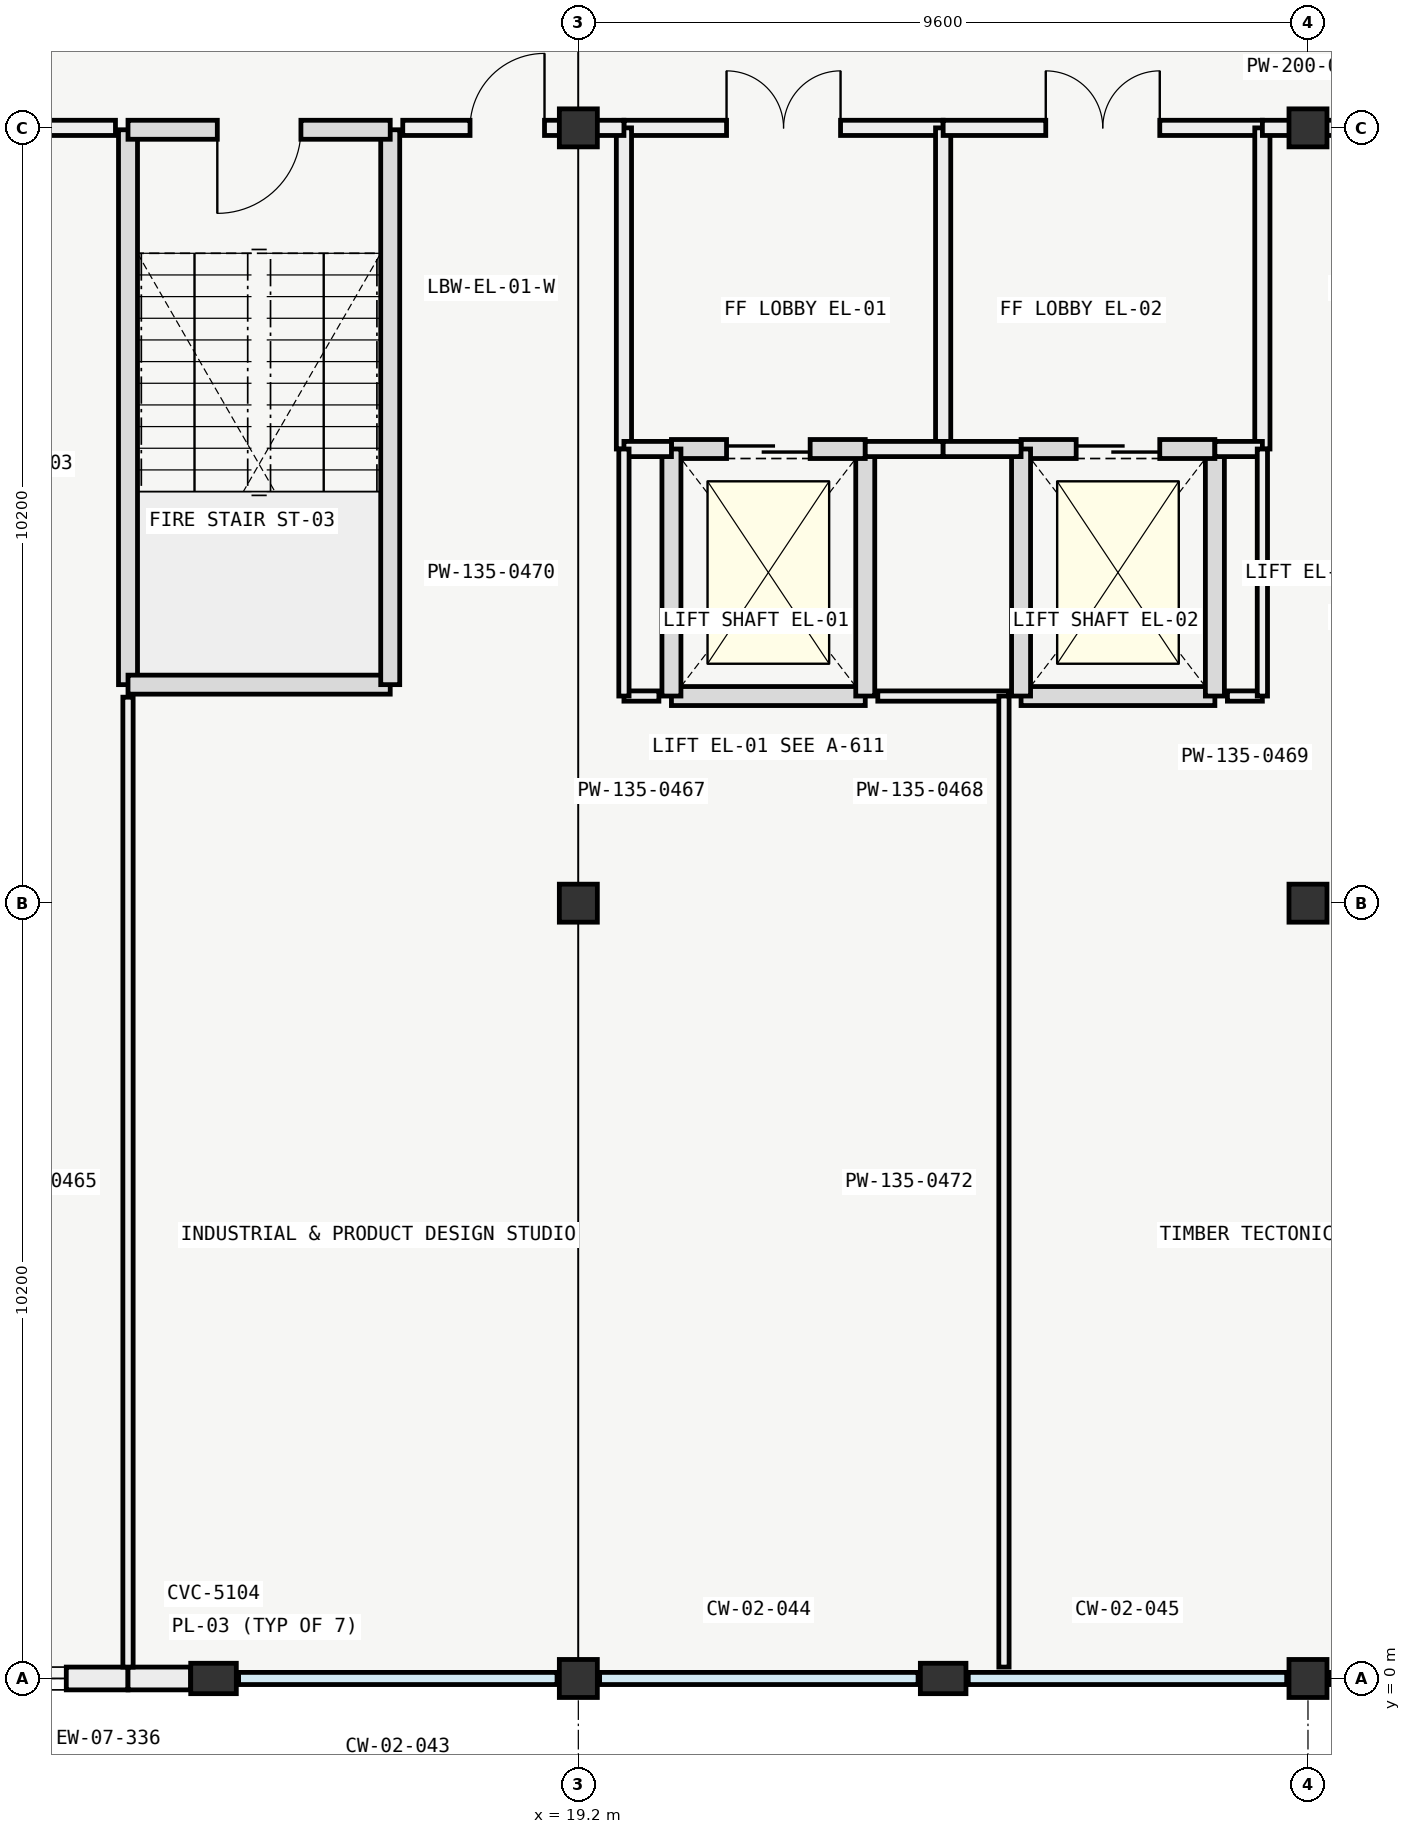
"""IFC4 building model, lengths in metres.
Left out: names, types, materials, properties, quantities, classifications, styles, units other than length and angle.
Written with IfcOpenShell. Run it as: python <this file> out.ifc"""

import sys

from ifc_helpers import new_model, si_unit, direction, frame, frame_2d, origin, origin_2d, place, context, subcontext, project, spatial, rectangle, extrude, element, fill, save


model = new_model("IFC4")
c1 = context("Model", 3, precision=1e-05, world=origin(), true_north=direction((0.0, 1.0)))
c2 = subcontext(c1, "Body", "Model", "MODEL_VIEW")
j1 = project(units=[si_unit("LENGTHUNIT", "METRE"), si_unit("PLANEANGLEUNIT", "RADIAN")], contexts=[c1])
p1 = place(None, origin())
s1 = spatial("IfcSite", under=j1, at=p1, CompositionType="ELEMENT")
p2 = place(p1, origin())
s2 = spatial("IfcBuilding", under=s1, at=p2, CompositionType="ELEMENT")
p3 = place(p2, frame((0.0, 0.0, 26.4)))
s3 = spatial("IfcBuildingStorey", under=s2, at=p3, CompositionType="ELEMENT", Elevation=26.4)
for number, where, z_axis, x_axis in (
    (1, (19.2, 0.0, 0.0), (0.0, 0.0, 1.0), (1.0, 0.0, 0.0)),
    (2, (19.2, 10.2, 0.0), (0.0, 0.0, 1.0), (1.0, 0.0, 0.0)),
    (3, (19.2, 20.4, 0.0), (0.0, 0.0, 1.0), (1.0, 0.0, 0.0)),
    (4, (28.8, 0.0, 0.0), (0.0, 0.0, 1.0), (1.0, 0.0, 0.0)),
    (5, (28.8, 10.2, 0.0), (0.0, 0.0, 1.0), (1.0, 0.0, 0.0)),
    (6, (28.8, 20.4, 0.0), (0.0, 0.0, 1.0), (1.0, 0.0, 0.0)),
):
    element("IfcColumn", number, at=place(p3, frame(where, z_axis=z_axis, x_axis=x_axis)), inside=s3, PredefinedType="COLUMN", context=c2, shape_type="SweptSolid", body=[
        extrude(rectangle(XDim=0.5, YDim=0.5, at=origin_2d()), origin(), (0.0, 0.0, 1.0), 4.2),
    ])
for number, where, z_axis, x_axis in (
    (7, (14.4, 0.0, 0.0), (0.0, 0.0, 1.0), (0.0, 1.0, 0.0)),
    (8, (24.0, 0.0, 0.0), (0.0, 0.0, 1.0), (0.0, 1.0, 0.0)),
):
    element("IfcColumn", number, at=place(p3, frame(where, z_axis=z_axis, x_axis=x_axis)), inside=s3, PredefinedType="PILASTER", context=c2, shape_type="SweptSolid", body=[
        extrude(rectangle(XDim=0.4, YDim=0.6, at=origin_2d()), origin(), (0.0, 0.0, 1.0), 4.2),
    ])
p4 = place(p3, frame((13.275, 0.0, 0.0), z_axis=(0.0, 0.0, 1.0), x_axis=(-1.0, 0.0, 0.0)))
e9 = element("IfcWall", 9, at=p4, inside=s3, PredefinedType="SOLIDWALL", context=c2, shape_type="SweptSolid", body=[
    extrude(rectangle(XDim=3.424, YDim=0.3, at=frame_2d((1.712, 0.0))), origin(), (0.0, 0.0, 1.0), 3.25),
])
p5 = place(p4, frame((0.812, 0.0, 0.8)))
e10 = element("IfcOpeningElement", 10, at=p5, cuts=e9, PredefinedType="OPENING", context=c2, shape_type="SweptSolid", body=[
    extrude(rectangle(XDim=1.8, YDim=2.1, at=frame_2d((0.9, 1.05))), frame((0.0, 0.16, 0.0), z_axis=(0.0, -1.0, 0.0), x_axis=(1.0, 0.0, 0.0)), (0.0, 0.0, 1.0), 0.32),
])
p6 = place(p3, frame((14.099, 0.0, 0.0), z_axis=(0.0, 0.0, 1.0), x_axis=(-1.0, 0.0, 0.0)))
e11 = element("IfcWall", 11, at=p6, inside=s3, PredefinedType="SOLIDWALL", context=c2, shape_type="SweptSolid", body=[
    extrude(rectangle(XDim=0.824, YDim=0.3, at=frame_2d((0.412, 0.0))), origin(), (0.0, 0.0, 1.0), 3.25),
])
p7 = place(p3, frame((13.275, 20.375, 0.0), z_axis=(0.0, 0.0, 1.0), x_axis=(0.0, -1.0, 0.0)))
e12 = element("IfcWall", 12, at=p7, inside=s3, PredefinedType="SOLIDWALL", context=c2, shape_type="SweptSolid", body=[
    extrude(rectangle(XDim=7.3, YDim=0.25, at=frame_2d((3.65, 0.0))), origin(), (0.0, 0.0, 1.0), 3.975),
])
p8 = place(p3, frame((13.275, 13.075, 0.0), z_axis=(0.0, 0.0, 1.0), x_axis=(1.0, 0.0, 0.0)))
e13 = element("IfcWall", 13, at=p8, inside=s3, PredefinedType="SOLIDWALL", context=c2, shape_type="SweptSolid", body=[
    extrude(rectangle(XDim=3.45, YDim=0.25, at=frame_2d((1.725, 0.0))), origin(), (0.0, 0.0, 1.0), 3.975),
])
p9 = place(p3, frame((16.725, 13.075, 0.0), z_axis=(0.0, 0.0, 1.0), x_axis=(0.0, 1.0, 0.0)))
e14 = element("IfcWall", 14, at=p9, inside=s3, PredefinedType="SOLIDWALL", context=c2, shape_type="SweptSolid", body=[
    extrude(rectangle(XDim=7.3, YDim=0.25, at=frame_2d((3.65, 0.0))), origin(), (0.0, 0.0, 1.0), 3.975),
])
p10 = place(p3, frame((16.725, 20.375, 0.0), z_axis=(0.0, 0.0, 1.0), x_axis=(-1.0, 0.0, 0.0)))
e15 = element("IfcWall", 15, at=p10, inside=s3, PredefinedType="SOLIDWALL", context=c2, shape_type="SweptSolid", body=[
    extrude(rectangle(XDim=3.45, YDim=0.25, at=frame_2d((1.725, 0.0))), origin(), (0.0, 0.0, 1.0), 3.975),
])
p11 = place(p10, frame((1.175, 0.0, 0.0)))
e16 = element("IfcOpeningElement", 16, at=p11, cuts=e15, PredefinedType="OPENING", context=c2, shape_type="SweptSolid", body=[
    extrude(rectangle(XDim=1.1, YDim=2.2, at=frame_2d((0.55, 1.1))), frame((0.0, 0.135, 0.0), z_axis=(0.0, -1.0, 0.0), x_axis=(1.0, 0.0, 0.0)), (0.0, 0.0, 1.0), 0.27),
])
p12 = place(p3, frame((20.425, 12.925, 0.0), z_axis=(0.0, 0.0, 1.0), x_axis=(1.0, 0.0, 0.0)))
e17 = element("IfcWall", 17, at=p12, inside=s3, PredefinedType="SOLIDWALL", context=c2, shape_type="SweptSolid", body=[
    extrude(rectangle(XDim=2.55, YDim=0.25, at=frame_2d((1.275, 0.0))), origin(), (0.0, 0.0, 1.0), 3.975),
])
p13 = place(p3, frame((22.975, 12.925, 0.0), z_axis=(0.0, 0.0, 1.0), x_axis=(0.0, 1.0, 0.0)))
e18 = element("IfcWall", 18, at=p13, inside=s3, PredefinedType="SOLIDWALL", context=c2, shape_type="SweptSolid", body=[
    extrude(rectangle(XDim=3.25, YDim=0.25, at=frame_2d((1.625, 0.0))), origin(), (0.0, 0.0, 1.0), 3.975),
])
p14 = place(p3, frame((22.975, 16.175, 0.0), z_axis=(0.0, 0.0, 1.0), x_axis=(-1.0, 0.0, 0.0)))
e19 = element("IfcWall", 19, at=p14, inside=s3, PredefinedType="SOLIDWALL", context=c2, shape_type="SweptSolid", body=[
    extrude(rectangle(XDim=2.55, YDim=0.25, at=frame_2d((1.275, 0.0))), origin(), (0.0, 0.0, 1.0), 3.975),
])
p15 = place(p14, frame((0.725, 0.0, 0.0)))
e20 = element("IfcOpeningElement", 20, at=p15, cuts=e19, PredefinedType="OPENING", context=c2, shape_type="SweptSolid", body=[
    extrude(rectangle(XDim=1.1, YDim=2.1, at=frame_2d((0.55, 1.05))), frame((0.0, 0.135, 0.0), z_axis=(0.0, -1.0, 0.0), x_axis=(1.0, 0.0, 0.0)), (0.0, 0.0, 1.0), 0.27),
])
p16 = place(p3, frame((20.425, 16.175, 0.0), z_axis=(0.0, 0.0, 1.0), x_axis=(0.0, -1.0, 0.0)))
e21 = element("IfcWall", 21, at=p16, inside=s3, PredefinedType="SOLIDWALL", context=c2, shape_type="SweptSolid", body=[
    extrude(rectangle(XDim=3.25, YDim=0.25, at=frame_2d((1.625, 0.0))), origin(), (0.0, 0.0, 1.0), 3.975),
])
p17 = place(p3, frame((19.8, 20.4, 0.0), z_axis=(0.0, 0.0, 1.0), x_axis=(1.0, 0.0, 0.0)))
e22 = element("IfcWall", 22, at=p17, inside=s3, PredefinedType="PARTITIONING", context=c2, shape_type="SweptSolid", body=[
    extrude(rectangle(XDim=4.2, YDim=0.2, at=frame_2d((2.1, 0.0))), origin(), (0.0, 0.0, 1.0), 3.405),
])
p18 = place(p17, frame((1.35, 0.0, 0.0)))
e23 = element("IfcOpeningElement", 23, at=p18, cuts=e22, PredefinedType="OPENING", context=c2, shape_type="SweptSolid", body=[
    extrude(rectangle(XDim=1.5, YDim=2.2, at=frame_2d((0.75, 1.1))), frame((0.0, 0.11, 0.0), z_axis=(0.0, -1.0, 0.0), x_axis=(1.0, 0.0, 0.0)), (0.0, 0.0, 1.0), 0.22),
])
for number, where, z_axis, x_axis in (
    (24, (19.8, 16.175, 0.0), (0.0, 0.0, 1.0), (0.0, 1.0, 0.0)),
    (25, (24.0, 16.175, 0.0), (0.0, 0.0, 1.0), (0.0, 1.0, 0.0)),
):
    element("IfcWall", number, at=place(p3, frame(where, z_axis=z_axis, x_axis=x_axis)), inside=s3, PredefinedType="PARTITIONING", context=c2, shape_type="SweptSolid", body=[
        extrude(rectangle(XDim=4.225, YDim=0.2, at=frame_2d((2.112, 0.0))), origin(), (0.0, 0.0, 1.0), 3.405),
    ])
p19 = place(p3, frame((19.8, 16.175, 0.0), z_axis=(0.0, 0.0, 1.0), x_axis=(1.0, 0.0, 0.0)))
e26 = element("IfcWall", 26, at=p19, inside=s3, PredefinedType="PARTITIONING", context=c2, shape_type="SweptSolid", body=[
    extrude(rectangle(XDim=0.625, YDim=0.2, at=frame_2d((0.312, 0.0))), origin(), (0.0, 0.0, 1.0), 3.55),
])
p20 = place(p3, frame((22.975, 16.175, 0.0), z_axis=(0.0, 0.0, 1.0), x_axis=(1.0, 0.0, 0.0)))
e27 = element("IfcWall", 27, at=p20, inside=s3, PredefinedType="PARTITIONING", context=c2, shape_type="SweptSolid", body=[
    extrude(rectangle(XDim=1.025, YDim=0.2, at=frame_2d((0.512, 0.0))), origin(), (0.0, 0.0, 1.0), 3.55),
])
p21 = place(p3, frame((25.025, 12.925, 0.0), z_axis=(0.0, 0.0, 1.0), x_axis=(1.0, 0.0, 0.0)))
e28 = element("IfcWall", 28, at=p21, inside=s3, PredefinedType="SOLIDWALL", context=c2, shape_type="SweptSolid", body=[
    extrude(rectangle(XDim=2.55, YDim=0.25, at=frame_2d((1.275, 0.0))), origin(), (0.0, 0.0, 1.0), 3.975),
])
p22 = place(p3, frame((27.575, 12.925, 0.0), z_axis=(0.0, 0.0, 1.0), x_axis=(0.0, 1.0, 0.0)))
e29 = element("IfcWall", 29, at=p22, inside=s3, PredefinedType="SOLIDWALL", context=c2, shape_type="SweptSolid", body=[
    extrude(rectangle(XDim=3.25, YDim=0.25, at=frame_2d((1.625, 0.0))), origin(), (0.0, 0.0, 1.0), 3.975),
])
p23 = place(p3, frame((27.575, 16.175, 0.0), z_axis=(0.0, 0.0, 1.0), x_axis=(-1.0, 0.0, 0.0)))
e30 = element("IfcWall", 30, at=p23, inside=s3, PredefinedType="SOLIDWALL", context=c2, shape_type="SweptSolid", body=[
    extrude(rectangle(XDim=2.55, YDim=0.25, at=frame_2d((1.275, 0.0))), origin(), (0.0, 0.0, 1.0), 3.975),
])
p24 = place(p23, frame((0.725, 0.0, 0.0)))
e31 = element("IfcOpeningElement", 31, at=p24, cuts=e30, PredefinedType="OPENING", context=c2, shape_type="SweptSolid", body=[
    extrude(rectangle(XDim=1.1, YDim=2.1, at=frame_2d((0.55, 1.05))), frame((0.0, 0.135, 0.0), z_axis=(0.0, -1.0, 0.0), x_axis=(1.0, 0.0, 0.0)), (0.0, 0.0, 1.0), 0.27),
])
p25 = place(p3, frame((25.025, 16.175, 0.0), z_axis=(0.0, 0.0, 1.0), x_axis=(0.0, -1.0, 0.0)))
e32 = element("IfcWall", 32, at=p25, inside=s3, PredefinedType="SOLIDWALL", context=c2, shape_type="SweptSolid", body=[
    extrude(rectangle(XDim=3.25, YDim=0.25, at=frame_2d((1.625, 0.0))), origin(), (0.0, 0.0, 1.0), 3.975),
])
p26 = place(p3, frame((24.0, 20.4, 0.0), z_axis=(0.0, 0.0, 1.0), x_axis=(1.0, 0.0, 0.0)))
e33 = element("IfcWall", 33, at=p26, inside=s3, PredefinedType="PARTITIONING", context=c2, shape_type="SweptSolid", body=[
    extrude(rectangle(XDim=4.2, YDim=0.2, at=frame_2d((2.1, 0.0))), origin(), (0.0, 0.0, 1.0), 3.405),
])
p27 = place(p26, frame((1.35, 0.0, 0.0)))
e34 = element("IfcOpeningElement", 34, at=p27, cuts=e33, PredefinedType="OPENING", context=c2, shape_type="SweptSolid", body=[
    extrude(rectangle(XDim=1.5, YDim=2.2, at=frame_2d((0.75, 1.1))), frame((0.0, 0.11, 0.0), z_axis=(0.0, -1.0, 0.0), x_axis=(1.0, 0.0, 0.0)), (0.0, 0.0, 1.0), 0.22),
])
p28 = place(p3, frame((28.2, 16.175, 0.0), z_axis=(0.0, 0.0, 1.0), x_axis=(0.0, 1.0, 0.0)))
e35 = element("IfcWall", 35, at=p28, inside=s3, PredefinedType="PARTITIONING", context=c2, shape_type="SweptSolid", body=[
    extrude(rectangle(XDim=4.225, YDim=0.2, at=frame_2d((2.112, 0.0))), origin(), (0.0, 0.0, 1.0), 3.405),
])
p29 = place(p3, frame((24.0, 16.175, 0.0), z_axis=(0.0, 0.0, 1.0), x_axis=(1.0, 0.0, 0.0)))
e36 = element("IfcWall", 36, at=p29, inside=s3, PredefinedType="PARTITIONING", context=c2, shape_type="SweptSolid", body=[
    extrude(rectangle(XDim=1.025, YDim=0.2, at=frame_2d((0.512, 0.0))), origin(), (0.0, 0.0, 1.0), 3.55),
])
p30 = place(p3, frame((27.575, 16.175, 0.0), z_axis=(0.0, 0.0, 1.0), x_axis=(1.0, 0.0, 0.0)))
e37 = element("IfcWall", 37, at=p30, inside=s3, PredefinedType="PARTITIONING", context=c2, shape_type="SweptSolid", body=[
    extrude(rectangle(XDim=0.625, YDim=0.2, at=frame_2d((0.312, 0.0))), origin(), (0.0, 0.0, 1.0), 3.55),
])
p31 = place(p3, frame((13.275, 0.15, 0.0), z_axis=(0.0, 0.0, 1.0), x_axis=(0.0, 1.0, 0.0)))
e38 = element("IfcWall", 38, at=p31, inside=s3, PredefinedType="PARTITIONING", context=c2, shape_type="SweptSolid", body=[
    extrude(rectangle(XDim=12.76, YDim=0.135, at=frame_2d((6.38, 0.0))), origin(), (0.0, 0.0, 1.0), 3.405),
])
p32 = place(p3, frame((0.15, 20.4, 0.0), z_axis=(0.0, 0.0, 1.0), x_axis=(1.0, 0.0, 0.0)))
e39 = element("IfcWall", 39, at=p32, inside=s3, PredefinedType="PARTITIONING", context=c2, shape_type="SweptSolid", body=[
    extrude(rectangle(XDim=12.96, YDim=0.2, at=frame_2d((6.48, 0.0))), origin(), (0.0, 0.0, 1.0), 3.305),
])
p33 = place(p32, frame((6.05, 0.0, 0.0)))
e40 = element("IfcOpeningElement", 40, at=p33, cuts=e39, PredefinedType="OPENING", context=c2, shape_type="SweptSolid", body=[
    extrude(rectangle(XDim=1.5, YDim=2.2, at=frame_2d((0.75, 1.1))), frame((0.0, 0.11, 0.0), z_axis=(0.0, -1.0, 0.0), x_axis=(1.0, 0.0, 0.0)), (0.0, 0.0, 1.0), 0.22),
])
p34 = place(p3, frame((19.8, 12.925, 0.0), z_axis=(0.0, 0.0, 1.0), x_axis=(1.0, 0.0, 0.0)))
e41 = element("IfcWall", 41, at=p34, inside=s3, PredefinedType="PARTITIONING", context=c2, shape_type="SweptSolid", body=[
    extrude(rectangle(XDim=0.46, YDim=0.135, at=frame_2d((0.23, 0.0))), origin(), (0.0, 0.0, 1.0), 3.85),
])
p35 = place(p3, frame((23.14, 12.925, 0.0), z_axis=(0.0, 0.0, 1.0), x_axis=(1.0, 0.0, 0.0)))
e42 = element("IfcWall", 42, at=p35, inside=s3, PredefinedType="PARTITIONING", context=c2, shape_type="SweptSolid", body=[
    extrude(rectangle(XDim=1.72, YDim=0.135, at=frame_2d((0.86, 0.0))), origin(), (0.0, 0.0, 1.0), 3.85),
])
p36 = place(p3, frame((27.74, 12.925, 0.0), z_axis=(0.0, 0.0, 1.0), x_axis=(1.0, 0.0, 0.0)))
e43 = element("IfcWall", 43, at=p36, inside=s3, PredefinedType="PARTITIONING", context=c2, shape_type="SweptSolid", body=[
    extrude(rectangle(XDim=0.46, YDim=0.135, at=frame_2d((0.23, 0.0))), origin(), (0.0, 0.0, 1.0), 3.85),
])
p37 = place(p3, frame((19.8, 12.925, 0.0), z_axis=(0.0, 0.0, 1.0), x_axis=(0.0, 1.0, 0.0)))
e44 = element("IfcWall", 44, at=p37, inside=s3, PredefinedType="PARTITIONING", context=c2, shape_type="SweptSolid", body=[
    extrude(rectangle(XDim=3.25, YDim=0.135, at=frame_2d((1.625, 0.0))), origin(), (0.0, 0.0, 1.0), 3.85),
])
p38 = place(p3, frame((16.89, 20.4, 0.0), z_axis=(0.0, 0.0, 1.0), x_axis=(1.0, 0.0, 0.0)))
e45 = element("IfcWall", 45, at=p38, inside=s3, PredefinedType="PARTITIONING", context=c2, shape_type="SweptSolid", body=[
    extrude(rectangle(XDim=2.91, YDim=0.2, at=frame_2d((1.455, 0.0))), origin(), (0.0, 0.0, 1.0), 3.305),
])
p39 = place(p38, frame((0.885, 0.0, 0.0)))
e46 = element("IfcOpeningElement", 46, at=p39, cuts=e45, PredefinedType="OPENING", context=c2, shape_type="SweptSolid", body=[
    extrude(rectangle(XDim=0.98, YDim=2.15, at=frame_2d((0.49, 1.075))), frame((0.0, 0.11, 0.0), z_axis=(0.0, -1.0, 0.0), x_axis=(1.0, 0.0, 0.0)), (0.0, 0.0, 1.0), 0.22),
])
p40 = place(p3, frame((24.8, 0.15, 0.0), z_axis=(0.0, 0.0, 1.0), x_axis=(0.0, 1.0, 0.0)))
e47 = element("IfcWall", 47, at=p40, inside=s3, PredefinedType="PARTITIONING", context=c2, shape_type="SweptSolid", body=[
    extrude(rectangle(XDim=12.775, YDim=0.135, at=frame_2d((6.388, 0.0))), origin(), (0.0, 0.0, 1.0), 3.405),
])
p41 = place(p3, frame((28.2, 12.925, 0.0), z_axis=(0.0, 0.0, 1.0), x_axis=(0.0, 1.0, 0.0)))
e48 = element("IfcWall", 48, at=p41, inside=s3, PredefinedType="PARTITIONING", context=c2, shape_type="SweptSolid", body=[
    extrude(rectangle(XDim=3.25, YDim=0.135, at=frame_2d((1.625, 0.0))), origin(), (0.0, 0.0, 1.0), 3.85),
])
p42 = place(p3, frame((28.2, 20.4, 0.0), z_axis=(0.0, 0.0, 1.0), x_axis=(1.0, 0.0, 0.0)))
e49 = element("IfcWall", 49, at=p42, inside=s3, PredefinedType="PARTITIONING", context=c2, shape_type="SweptSolid", body=[
    extrude(rectangle(XDim=3.11, YDim=0.2, at=frame_2d((1.555, 0.0))), origin(), (0.0, 0.0, 1.0), 3.305),
])
p43 = place(p42, frame((1.97, 0.0, 0.0)))
e50 = element("IfcOpeningElement", 50, at=p43, cuts=e49, PredefinedType="OPENING", context=c2, shape_type="SweptSolid", body=[
    extrude(rectangle(XDim=0.98, YDim=2.15, at=frame_2d((0.49, 1.075))), frame((0.0, 0.11, 0.0), z_axis=(0.0, -1.0, 0.0), x_axis=(1.0, 0.0, 0.0)), (0.0, 0.0, 1.0), 0.22),
])
p44 = place(p5, origin())
e51 = element("IfcWindow", 51, at=p44, inside=s3, PartitioningType="SINGLE_PANEL", PredefinedType="WINDOW", context=c2, shape_type="SweptSolid", body=[
    extrude(rectangle(XDim=1.8, YDim=2.1, at=frame_2d((0.9, 1.05))), frame((0.0, 0.03, 0.0), z_axis=(0.0, -1.0, 0.0), x_axis=(1.0, 0.0, 0.0)), (0.0, 0.0, 1.0), 0.06),
])
fill(e10, e51)
p45 = place(p11, origin())
e52 = element("IfcDoor", 52, at=p45, inside=s3, OperationType="SINGLE_SWING_RIGHT", PredefinedType="DOOR", context=c2, shape_type="SweptSolid", body=[
    extrude(rectangle(XDim=1.1, YDim=2.2, at=frame_2d((0.55, 1.1))), frame((0.0, 0.025, 0.0), z_axis=(0.0, -1.0, 0.0), x_axis=(1.0, 0.0, 0.0)), (0.0, 0.0, 1.0), 0.05),
])
fill(e16, e52)
p46 = place(p15, origin())
e53 = element("IfcDoor", 53, at=p46, inside=s3, OperationType="SLIDING_TO_LEFT", PredefinedType="DOOR", context=c2, shape_type="SweptSolid", body=[
    extrude(rectangle(XDim=1.1, YDim=2.1, at=frame_2d((0.55, 1.05))), frame((0.0, 0.025, 0.0), z_axis=(0.0, -1.0, 0.0), x_axis=(1.0, 0.0, 0.0)), (0.0, 0.0, 1.0), 0.05),
])
fill(e20, e53)
p47 = place(p18, origin())
e54 = element("IfcDoor", 54, at=p47, inside=s3, OperationType="SINGLE_SWING_LEFT", PredefinedType="DOOR", context=c2, shape_type="SweptSolid", body=[
    extrude(rectangle(XDim=1.5, YDim=2.2, at=frame_2d((0.75, 1.1))), frame((0.0, 0.025, 0.0), z_axis=(0.0, -1.0, 0.0), x_axis=(1.0, 0.0, 0.0)), (0.0, 0.0, 1.0), 0.05),
])
fill(e23, e54)
p48 = place(p24, origin())
e55 = element("IfcDoor", 55, at=p48, inside=s3, OperationType="SLIDING_TO_LEFT", PredefinedType="DOOR", context=c2, shape_type="SweptSolid", body=[
    extrude(rectangle(XDim=1.1, YDim=2.1, at=frame_2d((0.55, 1.05))), frame((0.0, 0.025, 0.0), z_axis=(0.0, -1.0, 0.0), x_axis=(1.0, 0.0, 0.0)), (0.0, 0.0, 1.0), 0.05),
])
fill(e31, e55)
p49 = place(p27, origin())
e56 = element("IfcDoor", 56, at=p49, inside=s3, OperationType="SINGLE_SWING_LEFT", PredefinedType="DOOR", context=c2, shape_type="SweptSolid", body=[
    extrude(rectangle(XDim=1.5, YDim=2.2, at=frame_2d((0.75, 1.1))), frame((0.0, 0.025, 0.0), z_axis=(0.0, -1.0, 0.0), x_axis=(1.0, 0.0, 0.0)), (0.0, 0.0, 1.0), 0.05),
])
fill(e34, e56)
p50 = place(p39, origin())
e57 = element("IfcDoor", 57, at=p50, inside=s3, OperationType="SINGLE_SWING_RIGHT", PredefinedType="DOOR", context=c2, shape_type="SweptSolid", body=[
    extrude(rectangle(XDim=0.98, YDim=2.15, at=frame_2d((0.49, 1.075))), frame((0.0, 0.025, 0.0), z_axis=(0.0, -1.0, 0.0), x_axis=(1.0, 0.0, 0.0)), (0.0, 0.0, 1.0), 0.05),
])
fill(e46, e57)
save(model, sys.argv[1])
